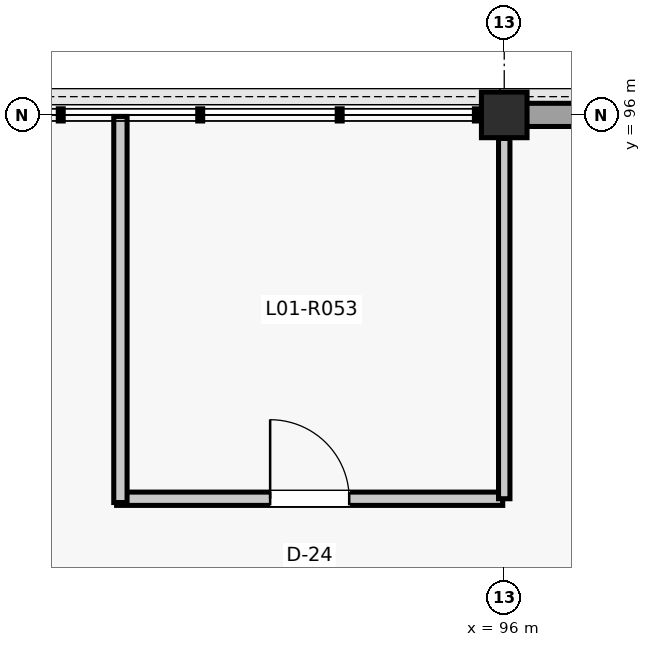
"""IFC4 building model, lengths in metres.
Left out: names, types, materials, properties, quantities, classifications, styles, units other than length and angle.
Written with IfcOpenShell. Run it as: python <this file> out.ifc"""

import sys

from ifc_helpers import new_model, si_unit, direction, frame, frame_2d, origin, origin_2d, place, context, subcontext, project, spatial, rectangle, extrude, element, fill, save


model = new_model("IFC4")
c1 = context("Model", 3, precision=1e-05, world=origin(), true_north=direction((0.0, 1.0)))
c2 = subcontext(c1, "Body", "Model", "MODEL_VIEW")
j1 = project(units=[si_unit("LENGTHUNIT", "METRE"), si_unit("PLANEANGLEUNIT", "RADIAN")], contexts=[c1])
p1 = place(None, origin())
s1 = spatial("IfcSite", under=j1, at=p1, CompositionType="ELEMENT")
p2 = place(p1, origin())
s2 = spatial("IfcBuilding", under=s1, at=p2, CompositionType="ELEMENT")
p3 = place(p2, frame((0.0, 0.0, 5.28)))
s3 = spatial("IfcBuildingStorey", under=s2, at=p3, CompositionType="ELEMENT", Elevation=5.28)
p4 = place(p3, frame((96.0, 96.0, 0.0), z_axis=(0.0, 0.0, 1.0), x_axis=(1.0, 0.0, 0.0)))
e1 = element("IfcColumn", 1, at=p4, inside=s3, PredefinedType="COLUMN", context=c2, shape_type="SweptSolid", body=[
    extrude(rectangle(XDim=0.6, YDim=0.6, at=origin_2d()), origin(), (0.0, 0.0, 1.0), 4.62),
])
p5 = place(p3, frame((96.285, 96.0, 0.0), z_axis=(0.0, 0.0, 1.0), x_axis=(1.0, 0.0, 0.0)))
e2 = element("IfcWall", 2, at=p5, inside=s3, PredefinedType="SOLIDWALL", context=c2, shape_type="SweptSolid", body=[
    extrude(rectangle(XDim=5.861, YDim=0.305, at=frame_2d((2.93, 0.0))), origin(), (0.0, 0.0, 1.0), 4.335),
])
p6 = place(p5, frame((1.955, 0.0, 0.9)))
e3 = element("IfcOpeningElement", 3, at=p6, cuts=e2, PredefinedType="OPENING", context=c2, shape_type="SweptSolid", body=[
    extrude(rectangle(XDim=1.95, YDim=2.45, at=frame_2d((0.975, 1.225))), frame((0.0, 0.162, 0.0), z_axis=(0.0, -1.0, 0.0), x_axis=(1.0, 0.0, 0.0)), (0.0, 0.0, 1.0), 0.325),
])
p7 = place(p3, frame((90.9, 90.95, 0.0), z_axis=(0.0, 0.0, 1.0), x_axis=(1.0, 0.0, 0.0)))
e4 = element("IfcWall", 4, at=p7, inside=s3, PredefinedType="PARTITIONING", context=c2, shape_type="SweptSolid", body=[
    extrude(rectangle(XDim=5.08, YDim=0.175, at=frame_2d((2.54, 0.0))), origin(), (0.0, 0.0, 1.0), 3.896),
])
p8 = place(p7, frame((2.02, 0.0, 0.0)))
e5 = element("IfcOpeningElement", 5, at=p8, cuts=e4, PredefinedType="OPENING", context=c2, shape_type="SweptSolid", body=[
    extrude(rectangle(XDim=1.04, YDim=2.18, at=frame_2d((0.52, 1.09))), frame((0.0, 0.097, 0.0), z_axis=(0.0, -1.0, 0.0), x_axis=(1.0, 0.0, 0.0)), (0.0, 0.0, 1.0), 0.195),
])
p9 = place(p3, frame((90.95, 90.9, 0.0), z_axis=(0.0, 0.0, 1.0), x_axis=(0.0, 1.0, 0.0)))
e6 = element("IfcWall", 6, at=p9, inside=s3, PredefinedType="PARTITIONING", context=c2, shape_type="SweptSolid", body=[
    extrude(rectangle(XDim=5.08, YDim=0.175, at=frame_2d((2.54, 0.0))), origin(), (0.0, 0.0, 1.0), 3.948),
])
p10 = place(p3, frame((96.0, 90.95, 0.0), z_axis=(0.0, 0.0, 1.0), x_axis=(0.0, 1.0, 0.0)))
e7 = element("IfcWall", 7, at=p10, inside=s3, PredefinedType="PARTITIONING", context=c2, shape_type="SweptSolid", body=[
    extrude(rectangle(XDim=4.74, YDim=0.15, at=frame_2d((2.37, 0.0))), origin(), (0.0, 0.0, 1.0), 3.896),
])
p11 = place(p8, origin())
e8 = element("IfcDoor", 8, at=p11, inside=s3, OperationType="SINGLE_SWING_LEFT", PredefinedType="DOOR", context=c2, shape_type="SweptSolid", body=[
    extrude(rectangle(XDim=1.04, YDim=2.18, at=frame_2d((0.52, 1.09))), frame((0.0, 0.025, 0.0), z_axis=(0.0, -1.0, 0.0), x_axis=(1.0, 0.0, 0.0)), (0.0, 0.0, 1.0), 0.05),
])
fill(e5, e8)
save(model, sys.argv[1])
